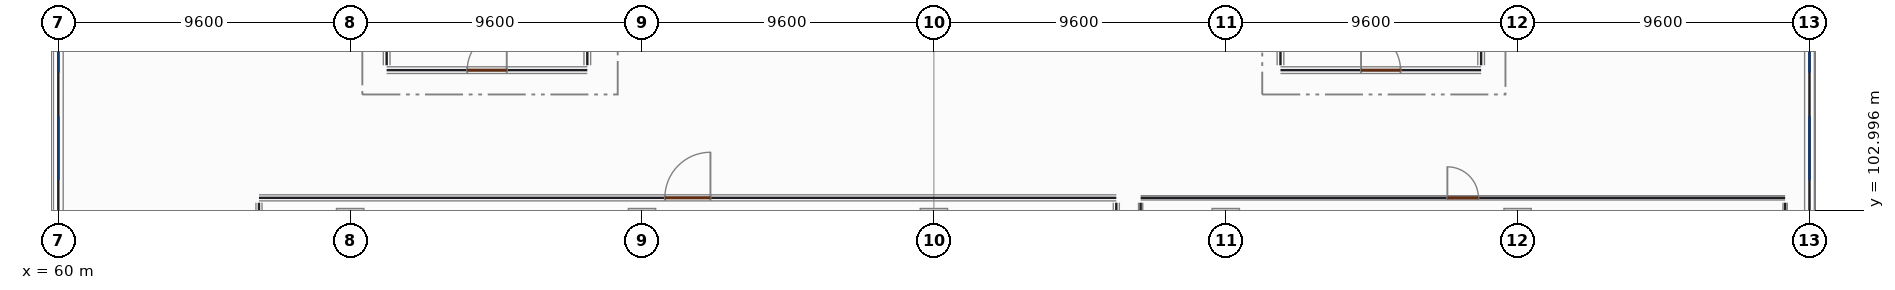
"""IFC4 building model, lengths in metres.
Left out: names, types, materials, properties, quantities, classifications, styles, units other than length and angle.
Written with IfcOpenShell. Run it as: python <this file> out.ifc"""

import sys

from ifc_helpers import new_model, si_unit, direction, frame, frame_2d, origin, origin_2d, place, context, subcontext, project, spatial, rectangle, extrude, element, fill, save


model = new_model("IFC4")
c1 = context("Model", 3, precision=1e-05, world=origin(), true_north=direction((0.0, 1.0)))
c2 = subcontext(c1, "Body", "Model", "MODEL_VIEW")
j1 = project(units=[si_unit("LENGTHUNIT", "METRE"), si_unit("PLANEANGLEUNIT", "RADIAN")], contexts=[c1])
p1 = place(None, origin())
s1 = spatial("IfcSite", under=j1, at=p1, CompositionType="ELEMENT")
p2 = place(p1, origin())
s2 = spatial("IfcBuilding", under=s1, at=p2, CompositionType="ELEMENT")
p3 = place(p2, frame((0.0, 0.0, 9.9)))
s3 = spatial("IfcBuildingStorey", under=s2, at=p3, CompositionType="ELEMENT", Elevation=9.9)
for number, where, z_axis, x_axis in (
    (1, (69.6, 102.6, 0.0), (0.0, 0.0, 1.0), (1.0, 0.0, 0.0)),
    (2, (79.2, 102.6, 0.0), (0.0, 0.0, 1.0), (1.0, 0.0, 0.0)),
    (3, (88.8, 102.6, 0.0), (0.0, 0.0, 1.0), (1.0, 0.0, 0.0)),
    (4, (98.4, 102.6, 0.0), (0.0, 0.0, 1.0), (1.0, 0.0, 0.0)),
    (5, (108.0, 102.6, 0.0), (0.0, 0.0, 1.0), (1.0, 0.0, 0.0)),
):
    element("IfcColumn", number, at=place(p3, frame(where, z_axis=z_axis, x_axis=x_axis)), inside=s3, PredefinedType="COLUMN", context=c2, shape_type="SweptSolid", body=[
        extrude(rectangle(XDim=0.9, YDim=0.9, at=origin_2d()), origin(), (0.0, 0.0, 1.0), 3.9),
    ])
p4 = place(p3, frame((60.0, 102.952, 0.0), z_axis=(0.0, 0.0, 1.0), x_axis=(0.0, 1.0, 0.0)))
e6 = element("IfcWall", 6, at=p4, inside=s3, PredefinedType="SOLIDWALL", context=c2, shape_type="SweptSolid", body=[
    extrude(rectangle(XDim=7.696, YDim=0.32, at=frame_2d((3.848, 0.0))), origin(), (0.0, 0.0, 1.0), 3.08),
])
p5 = place(p4, frame((1.028, 0.0, 0.85)))
e7 = element("IfcOpeningElement", 7, at=p5, cuts=e6, PredefinedType="OPENING", context=c2, shape_type="SweptSolid", body=[
    extrude(rectangle(XDim=2.1, YDim=1.95, at=frame_2d((1.05, 0.975))), frame((0.0, 0.17, 0.0), z_axis=(0.0, -1.0, 0.0), x_axis=(1.0, 0.0, 0.0)), (0.0, 0.0, 1.0), 0.34),
])
p6 = place(p4, frame((4.568, 0.0, 0.85)))
e8 = element("IfcOpeningElement", 8, at=p6, cuts=e6, PredefinedType="OPENING", context=c2, shape_type="SweptSolid", body=[
    extrude(rectangle(XDim=2.1, YDim=1.95, at=frame_2d((1.05, 0.975))), frame((0.0, 0.17, 0.0), z_axis=(0.0, -1.0, 0.0), x_axis=(1.0, 0.0, 0.0)), (0.0, 0.0, 1.0), 0.34),
])
p7 = place(p3, frame((117.6, 102.952, 0.0), z_axis=(0.0, 0.0, 1.0), x_axis=(0.0, 1.0, 0.0)))
e9 = element("IfcWall", 9, at=p7, inside=s3, PredefinedType="SOLIDWALL", context=c2, shape_type="SweptSolid", body=[
    extrude(rectangle(XDim=7.696, YDim=0.32, at=frame_2d((3.848, 0.0))), origin(), (0.0, 0.0, 1.0), 3.08),
])
p8 = place(p7, frame((1.028, 0.0, 0.85)))
e10 = element("IfcOpeningElement", 10, at=p8, cuts=e9, PredefinedType="OPENING", context=c2, shape_type="SweptSolid", body=[
    extrude(rectangle(XDim=2.1, YDim=1.95, at=frame_2d((1.05, 0.975))), frame((0.0, 0.17, 0.0), z_axis=(0.0, -1.0, 0.0), x_axis=(1.0, 0.0, 0.0)), (0.0, 0.0, 1.0), 0.34),
])
p9 = place(p7, frame((4.568, 0.0, 0.85)))
e11 = element("IfcOpeningElement", 11, at=p9, cuts=e9, PredefinedType="OPENING", context=c2, shape_type="SweptSolid", body=[
    extrude(rectangle(XDim=2.1, YDim=1.95, at=frame_2d((1.05, 0.975))), frame((0.0, 0.17, 0.0), z_axis=(0.0, -1.0, 0.0), x_axis=(1.0, 0.0, 0.0)), (0.0, 0.0, 1.0), 0.34),
])
p10 = place(p3, frame((70.8, 107.6, 0.0), z_axis=(0.0, 0.0, 1.0), x_axis=(1.0, 0.0, 0.0)))
e12 = element("IfcWall", 12, at=p10, inside=s3, PredefinedType="PARTITIONING", context=c2, shape_type="SweptSolid", body=[
    extrude(rectangle(XDim=6.6, YDim=0.22, at=frame_2d((3.3, 0.0))), origin(), (0.0, 0.0, 1.0), 2.92),
])
p11 = place(p10, frame((2.65, 0.0, 0.0)))
e13 = element("IfcOpeningElement", 13, at=p11, cuts=e12, PredefinedType="OPENING", context=c2, shape_type="SweptSolid", body=[
    extrude(rectangle(XDim=1.3, YDim=2.2, at=frame_2d((0.65, 1.1))), frame((0.0, 0.12, 0.0), z_axis=(0.0, -1.0, 0.0), x_axis=(1.0, 0.0, 0.0)), (0.0, 0.0, 1.0), 0.24),
])
for number, where, z_axis, x_axis in (
    (14, (70.8, 107.76, 0.0), (0.0, 0.0, 1.0), (0.0, 1.0, 0.0)),
    (15, (77.4, 107.76, 0.0), (0.0, 0.0, 1.0), (0.0, 1.0, 0.0)),
):
    element("IfcWall", number, at=place(p3, frame(where, z_axis=z_axis, x_axis=x_axis)), inside=s3, PredefinedType="PARTITIONING", context=c2, shape_type="SweptSolid", body=[
        extrude(rectangle(XDim=3.08, YDim=0.22, at=frame_2d((1.54, 0.0))), origin(), (0.0, 0.0, 1.0), 2.92),
    ])
p12 = place(p3, frame((100.2, 107.6, 0.0), z_axis=(0.0, 0.0, 1.0), x_axis=(1.0, 0.0, 0.0)))
e16 = element("IfcWall", 16, at=p12, inside=s3, PredefinedType="PARTITIONING", context=c2, shape_type="SweptSolid", body=[
    extrude(rectangle(XDim=6.6, YDim=0.22, at=frame_2d((3.3, 0.0))), origin(), (0.0, 0.0, 1.0), 2.92),
])
p13 = place(p12, frame((2.65, 0.0, 0.0)))
e17 = element("IfcOpeningElement", 17, at=p13, cuts=e16, PredefinedType="OPENING", context=c2, shape_type="SweptSolid", body=[
    extrude(rectangle(XDim=1.3, YDim=2.2, at=frame_2d((0.65, 1.1))), frame((0.0, 0.12, 0.0), z_axis=(0.0, -1.0, 0.0), x_axis=(1.0, 0.0, 0.0)), (0.0, 0.0, 1.0), 0.24),
])
for number, where, z_axis, x_axis in (
    (18, (100.2, 107.76, 0.0), (0.0, 0.0, 1.0), (0.0, 1.0, 0.0)),
    (19, (106.8, 107.76, 0.0), (0.0, 0.0, 1.0), (0.0, 1.0, 0.0)),
):
    element("IfcWall", number, at=place(p3, frame(where, z_axis=z_axis, x_axis=x_axis)), inside=s3, PredefinedType="PARTITIONING", context=c2, shape_type="SweptSolid", body=[
        extrude(rectangle(XDim=3.08, YDim=0.22, at=frame_2d((1.54, 0.0))), origin(), (0.0, 0.0, 1.0), 2.92),
    ])
p14 = place(p3, frame((66.6, 103.4, 0.0), z_axis=(0.0, 0.0, 1.0), x_axis=(1.0, 0.0, 0.0)))
e20 = element("IfcWall", 20, at=p14, inside=s3, PredefinedType="PARTITIONING", context=c2, shape_type="SweptSolid", body=[
    extrude(rectangle(XDim=28.2, YDim=0.2, at=frame_2d((14.1, 0.0))), origin(), (0.0, 0.0, 1.0), 2.92),
])
p15 = place(p14, frame((13.35, 0.0, 0.0)))
e21 = element("IfcOpeningElement", 21, at=p15, cuts=e20, PredefinedType="OPENING", context=c2, shape_type="SweptSolid", body=[
    extrude(rectangle(XDim=1.5, YDim=2.2, at=frame_2d((0.75, 1.1))), frame((0.0, 0.11, 0.0), z_axis=(0.0, -1.0, 0.0), x_axis=(1.0, 0.0, 0.0)), (0.0, 0.0, 1.0), 0.22),
])
for number, where, z_axis, x_axis in (
    (22, (66.6, 87.76, 0.0), (0.0, 0.0, 1.0), (0.0, 1.0, 0.0)),
    (23, (94.8, 87.76, 0.0), (0.0, 0.0, 1.0), (0.0, 1.0, 0.0)),
):
    element("IfcWall", number, at=place(p3, frame(where, z_axis=z_axis, x_axis=x_axis)), inside=s3, PredefinedType="PARTITIONING", context=c2, shape_type="SweptSolid", body=[
        extrude(rectangle(XDim=15.48, YDim=0.2, at=frame_2d((7.74, 0.0))), origin(), (0.0, 0.0, 1.0), 2.92),
    ])
p16 = place(p3, frame((95.6, 103.4, 0.0), z_axis=(0.0, 0.0, 1.0), x_axis=(1.0, 0.0, 0.0)))
e24 = element("IfcWall", 24, at=p16, inside=s3, PredefinedType="PARTITIONING", context=c2, shape_type="SweptSolid", body=[
    extrude(rectangle(XDim=21.2, YDim=0.14, at=frame_2d((10.6, 0.0))), origin(), (0.0, 0.0, 1.0), 2.92),
])
p17 = place(p16, frame((10.09, 0.0, 0.0)))
e25 = element("IfcOpeningElement", 25, at=p17, cuts=e24, PredefinedType="OPENING", context=c2, shape_type="SweptSolid", body=[
    extrude(rectangle(XDim=1.02, YDim=2.2, at=frame_2d((0.51, 1.1))), frame((0.0, 0.08, 0.0), z_axis=(0.0, -1.0, 0.0), x_axis=(1.0, 0.0, 0.0)), (0.0, 0.0, 1.0), 0.16),
])
for number, where, z_axis, x_axis in (
    (26, (95.6, 87.76, 0.0), (0.0, 0.0, 1.0), (0.0, 1.0, 0.0)),
    (27, (116.8, 87.76, 0.0), (0.0, 0.0, 1.0), (0.0, 1.0, 0.0)),
):
    element("IfcWall", number, at=place(p3, frame(where, z_axis=z_axis, x_axis=x_axis)), inside=s3, PredefinedType="PARTITIONING", context=c2, shape_type="SweptSolid", body=[
        extrude(rectangle(XDim=15.48, YDim=0.14, at=frame_2d((7.74, 0.0))), origin(), (0.0, 0.0, 1.0), 2.92),
    ])
p18 = place(p5, origin())
e28 = element("IfcWindow", 28, at=p18, inside=s3, PartitioningType="SINGLE_PANEL", PredefinedType="WINDOW", context=c2, shape_type="SweptSolid", body=[
    extrude(rectangle(XDim=2.1, YDim=1.95, at=frame_2d((1.05, 0.975))), frame((0.0, 0.03, 0.0), z_axis=(0.0, -1.0, 0.0), x_axis=(1.0, 0.0, 0.0)), (0.0, 0.0, 1.0), 0.06),
])
fill(e7, e28)
p19 = place(p6, origin())
e29 = element("IfcWindow", 29, at=p19, inside=s3, PartitioningType="SINGLE_PANEL", PredefinedType="WINDOW", context=c2, shape_type="SweptSolid", body=[
    extrude(rectangle(XDim=2.1, YDim=1.95, at=frame_2d((1.05, 0.975))), frame((0.0, 0.03, 0.0), z_axis=(0.0, -1.0, 0.0), x_axis=(1.0, 0.0, 0.0)), (0.0, 0.0, 1.0), 0.06),
])
fill(e8, e29)
p20 = place(p8, origin())
e30 = element("IfcWindow", 30, at=p20, inside=s3, PartitioningType="SINGLE_PANEL", PredefinedType="WINDOW", context=c2, shape_type="SweptSolid", body=[
    extrude(rectangle(XDim=2.1, YDim=1.95, at=frame_2d((1.05, 0.975))), frame((0.0, 0.03, 0.0), z_axis=(0.0, -1.0, 0.0), x_axis=(1.0, 0.0, 0.0)), (0.0, 0.0, 1.0), 0.06),
])
fill(e10, e30)
p21 = place(p9, origin())
e31 = element("IfcWindow", 31, at=p21, inside=s3, PartitioningType="SINGLE_PANEL", PredefinedType="WINDOW", context=c2, shape_type="SweptSolid", body=[
    extrude(rectangle(XDim=2.1, YDim=1.95, at=frame_2d((1.05, 0.975))), frame((0.0, 0.03, 0.0), z_axis=(0.0, -1.0, 0.0), x_axis=(1.0, 0.0, 0.0)), (0.0, 0.0, 1.0), 0.06),
])
fill(e11, e31)
p22 = place(p11, origin())
e32 = element("IfcDoor", 32, at=p22, inside=s3, OperationType="SINGLE_SWING_RIGHT", PredefinedType="DOOR", context=c2, shape_type="SweptSolid", body=[
    extrude(rectangle(XDim=1.3, YDim=2.2, at=frame_2d((0.65, 1.1))), frame((0.0, 0.025, 0.0), z_axis=(0.0, -1.0, 0.0), x_axis=(1.0, 0.0, 0.0)), (0.0, 0.0, 1.0), 0.05),
])
fill(e13, e32)
p23 = place(p13, origin())
e33 = element("IfcDoor", 33, at=p23, inside=s3, OperationType="SINGLE_SWING_LEFT", PredefinedType="DOOR", context=c2, shape_type="SweptSolid", body=[
    extrude(rectangle(XDim=1.3, YDim=2.2, at=frame_2d((0.65, 1.1))), frame((0.0, 0.025, 0.0), z_axis=(0.0, -1.0, 0.0), x_axis=(1.0, 0.0, 0.0)), (0.0, 0.0, 1.0), 0.05),
])
fill(e17, e33)
p24 = place(p15, origin())
e34 = element("IfcDoor", 34, at=p24, inside=s3, OperationType="SINGLE_SWING_RIGHT", PredefinedType="DOOR", context=c2, shape_type="SweptSolid", body=[
    extrude(rectangle(XDim=1.5, YDim=2.2, at=frame_2d((0.75, 1.1))), frame((0.0, 0.025, 0.0), z_axis=(0.0, -1.0, 0.0), x_axis=(1.0, 0.0, 0.0)), (0.0, 0.0, 1.0), 0.05),
])
fill(e21, e34)
p25 = place(p17, origin())
e35 = element("IfcDoor", 35, at=p25, inside=s3, OperationType="SINGLE_SWING_LEFT", PredefinedType="DOOR", context=c2, shape_type="SweptSolid", body=[
    extrude(rectangle(XDim=1.02, YDim=2.2, at=frame_2d((0.51, 1.1))), frame((0.0, 0.025, 0.0), z_axis=(0.0, -1.0, 0.0), x_axis=(1.0, 0.0, 0.0)), (0.0, 0.0, 1.0), 0.05),
])
fill(e25, e35)
save(model, sys.argv[1])
